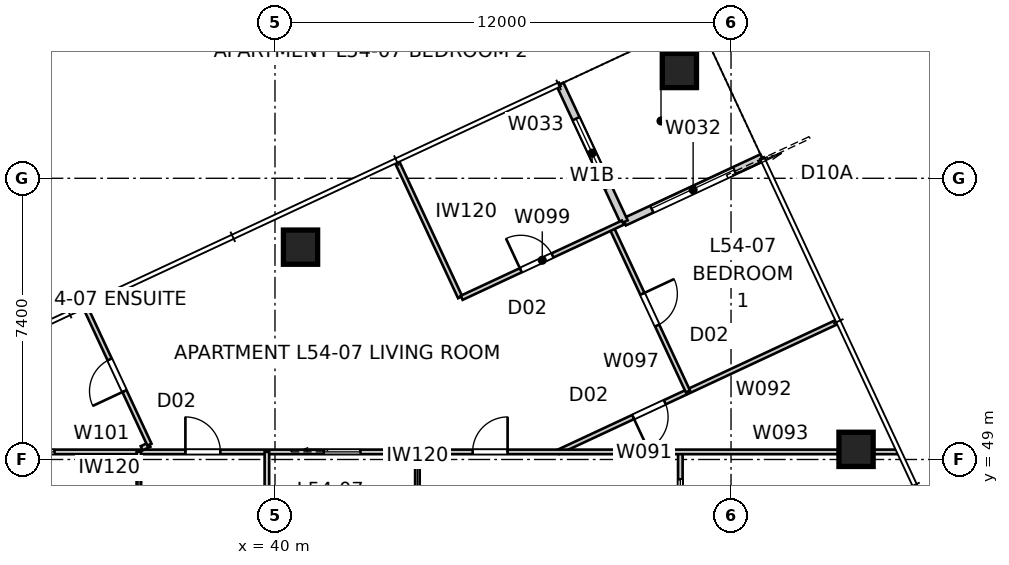
"""IFC4 building model, lengths in metres.
Left out: names, types, materials, properties, quantities, classifications, styles, units other than length and angle.
Written with IfcOpenShell. Run it as: python <this file> out.ifc"""

import sys

from ifc_helpers import new_model, si_unit, direction, frame, frame_2d, origin, origin_2d, place, context, subcontext, project, spatial, rectangle, extrude, element, fill, save


model = new_model("IFC4")
c1 = context("Model", 3, precision=1e-05, world=origin(), true_north=direction((0.0, 1.0)))
c2 = subcontext(c1, "Body", "Model", "MODEL_VIEW")
j1 = project(units=[si_unit("LENGTHUNIT", "METRE"), si_unit("PLANEANGLEUNIT", "RADIAN")], contexts=[c1])
p1 = place(None, origin())
s1 = spatial("IfcSite", under=j1, at=p1, CompositionType="ELEMENT")
p2 = place(p1, origin())
s2 = spatial("IfcBuilding", under=s1, at=p2, CompositionType="ELEMENT")
p3 = place(p2, frame((0.0, 0.0, 196.4)))
s3 = spatial("IfcBuildingStorey", under=s2, at=p3, CompositionType="ELEMENT", Elevation=196.4)
for number, where, z_axis, x_axis in (
    (1, (55.29, 49.267, 0.0), (0.0, 0.0, 1.0), (1.0, 0.0, 0.0)),
    (2, (50.641, 59.236, 0.0), (0.0, 0.0, 1.0), (1.0, 0.0, 0.0)),
    (3, (40.672, 54.588, 0.0), (0.0, 0.0, 1.0), (1.0, 0.0, 0.0)),
):
    element("IfcColumn", number, at=place(p3, frame(where, z_axis=z_axis, x_axis=x_axis)), inside=s3, PredefinedType="COLUMN", context=c2, shape_type="SweptSolid", body=[
        extrude(rectangle(XDim=0.9, YDim=0.9, at=origin_2d()), origin(), (0.0, 0.0, 1.0), 3.4),
    ])
p4 = place(p3, frame((52.815, 56.94, 0.0), z_axis=(0.0, 0.0, 1.0), x_axis=(-0.906289140828, -0.422658246362, 0.0)))
e4 = element("IfcWall", 4, at=p4, inside=s3, PredefinedType="SOLIDWALL", context=c2, shape_type="SweptSolid", body=[
    extrude(rectangle(XDim=4.0, YDim=0.2, at=frame_2d((2.0, 0.0))), origin(), (0.0, 0.0, 1.0), 3.25),
])
p5 = place(p4, frame((0.8, 0.0, 0.0)))
e5 = element("IfcOpeningElement", 5, at=p5, cuts=e4, PredefinedType="OPENING", context=c2, shape_type="SweptSolid", body=[
    extrude(rectangle(XDim=2.4, YDim=2.1, at=frame_2d((1.2, 1.05))), frame((0.0, 0.11, 0.0), z_axis=(0.0, -1.0, 0.0), x_axis=(1.0, 0.0, 0.0)), (0.0, 0.0, 1.0), 0.22),
])
p6 = place(p3, frame((49.19, 55.25, 0.0), z_axis=(0.0, 0.0, 1.0), x_axis=(-0.422658246362, 0.906289140828, 0.0)))
e6 = element("IfcWall", 6, at=p6, inside=s3, PredefinedType="SOLIDWALL", context=c2, shape_type="SweptSolid", body=[
    extrude(rectangle(XDim=4.0, YDim=0.2, at=frame_2d((2.0, 0.0))), origin(), (0.0, 0.0, 1.0), 3.25),
])
p7 = place(p6, frame((1.0, 0.0, 0.45)))
e7 = element("IfcOpeningElement", 7, at=p7, cuts=e6, PredefinedType="OPENING", context=c2, shape_type="SweptSolid", body=[
    extrude(rectangle(XDim=2.0, YDim=1.8, at=frame_2d((1.0, 0.9))), frame((0.0, 0.11, 0.0), z_axis=(0.0, -1.0, 0.0), x_axis=(1.0, 0.0, 0.0)), (0.0, 0.0, 1.0), 0.22),
])
p8 = place(p3, frame((50.666, 46.8, 0.0), z_axis=(0.0, 0.0, 1.0), x_axis=(0.0, 1.0, 0.0)))
e8 = element("IfcWall", 8, at=p8, inside=s3, PredefinedType="PARTITIONING", context=c2, shape_type="SweptSolid", body=[
    extrude(rectangle(XDim=2.4, YDim=0.12, at=frame_2d((1.2, 0.0))), origin(), (0.0, 0.0, 1.0), 3.25),
])
p9 = place(p8, frame((0.72, 0.0, 0.0)))
e9 = element("IfcOpeningElement", 9, at=p9, cuts=e8, PredefinedType="OPENING", context=c2, shape_type="SweptSolid", body=[
    extrude(rectangle(XDim=0.96, YDim=2.1, at=frame_2d((0.48, 1.05))), frame((0.0, 0.07, 0.0), z_axis=(0.0, -1.0, 0.0), x_axis=(1.0, 0.0, 0.0)), (0.0, 0.0, 1.0), 0.14),
])
p10 = place(p3, frame((54.787, 52.618, 0.0), z_axis=(0.0, 0.0, 1.0), x_axis=(-0.906311876708, -0.422609491301, 0.0)))
e10 = element("IfcWall", 10, at=p10, inside=s3, PredefinedType="PARTITIONING", context=c2, shape_type="SweptSolid", body=[
    extrude(rectangle(XDim=8.088, YDim=0.12, at=frame_2d((4.044, 0.0))), origin(), (0.0, 0.0, 1.0), 3.25),
])
p11 = place(p10, frame((4.997, 0.0, 0.0)))
e11 = element("IfcOpeningElement", 11, at=p11, cuts=e10, PredefinedType="OPENING", context=c2, shape_type="SweptSolid", body=[
    extrude(rectangle(XDim=0.92, YDim=2.34, at=frame_2d((0.46, 1.17))), frame((0.0, 0.07, 0.0), z_axis=(0.0, -1.0, 0.0), x_axis=(1.0, 0.0, 0.0)), (0.0, 0.0, 1.0), 0.14),
])
p12 = place(p3, frame((31.047, 49.2, 0.0), z_axis=(0.0, 0.0, 1.0), x_axis=(1.0, 0.0, 0.0)))
e12 = element("IfcWall", 12, at=p12, inside=s3, PredefinedType="PARTITIONING", context=c2, shape_type="SweptSolid", body=[
    extrude(rectangle(XDim=25.333, YDim=0.12, at=frame_2d((12.667, 0.0))), origin(), (0.0, 0.0, 1.0), 3.25),
])
p13 = place(p12, frame((14.154, 0.0, 0.0)))
e13 = element("IfcOpeningElement", 13, at=p13, cuts=e12, PredefinedType="OPENING", context=c2, shape_type="SweptSolid", body=[
    extrude(rectangle(XDim=0.92, YDim=2.34, at=frame_2d((0.46, 1.17))), frame((0.0, 0.07, 0.0), z_axis=(0.0, -1.0, 0.0), x_axis=(1.0, 0.0, 0.0)), (0.0, 0.0, 1.0), 0.14),
])
p14 = place(p12, frame((10.24, 0.0, 0.0)))
e14 = element("IfcOpeningElement", 14, at=p14, cuts=e12, PredefinedType="OPENING", context=c2, shape_type="SweptSolid", body=[
    extrude(rectangle(XDim=0.96, YDim=2.1, at=frame_2d((0.48, 1.05))), frame((0.0, 0.07, 0.0), z_axis=(0.0, -1.0, 0.0), x_axis=(1.0, 0.0, 0.0)), (0.0, 0.0, 1.0), 0.14),
])
p15 = place(p12, frame((6.596, 0.0, 0.0)))
e15 = element("IfcOpeningElement", 15, at=p15, cuts=e12, PredefinedType="OPENING", context=c2, shape_type="SweptSolid", body=[
    extrude(rectangle(XDim=0.92, YDim=2.34, at=frame_2d((0.46, 1.17))), frame((0.0, 0.07, 0.0), z_axis=(0.0, -1.0, 0.0), x_axis=(1.0, 0.0, 0.0)), (0.0, 0.0, 1.0), 0.14),
])
p16 = place(p12, frame((2.19, 0.0, 0.0)))
e16 = element("IfcOpeningElement", 16, at=p16, cuts=e12, PredefinedType="OPENING", context=c2, shape_type="SweptSolid", body=[
    extrude(rectangle(XDim=0.96, YDim=2.1, at=frame_2d((0.48, 1.05))), frame((0.0, 0.07, 0.0), z_axis=(0.0, -1.0, 0.0), x_axis=(1.0, 0.0, 0.0)), (0.0, 0.0, 1.0), 0.14),
])
for number, where, z_axis, x_axis in (
    (17, (43.748, 46.8, 0.0), (0.0, 0.0, 1.0), (0.0, 1.0, 0.0)),
    (18, (36.418, 49.2, 0.0), (0.0, 0.0, 1.0), (0.0, -1.0, 0.0)),
    (19, (39.787, 46.8, 0.0), (0.0, 0.0, 1.0), (0.0, 1.0, 0.0)),
):
    element("IfcWall", number, at=place(p3, frame(where, z_axis=z_axis, x_axis=x_axis)), inside=s3, PredefinedType="PARTITIONING", context=c2, shape_type="SweptSolid", body=[
        extrude(rectangle(XDim=2.4, YDim=0.12, at=frame_2d((1.2, 0.0))), origin(), (0.0, 0.0, 1.0), 3.25),
    ])
p17 = place(p3, frame((48.858, 55.095, 0.0), z_axis=(0.0, 0.0, 1.0), x_axis=(0.422643468278, -0.906296032609, 0.0)))
e20 = element("IfcWall", 20, at=p17, inside=s3, PredefinedType="PARTITIONING", context=c2, shape_type="SweptSolid", body=[
    extrude(rectangle(XDim=4.75, YDim=0.12, at=frame_2d((2.375, 0.0))), origin(), (0.0, 0.0, 1.0), 3.25),
])
p18 = place(p17, frame((1.915, 0.0, 0.0)))
e21 = element("IfcOpeningElement", 21, at=p18, cuts=e20, PredefinedType="OPENING", context=c2, shape_type="SweptSolid", body=[
    extrude(rectangle(XDim=0.92, YDim=2.34, at=frame_2d((0.46, 1.17))), frame((0.0, 0.07, 0.0), z_axis=(0.0, -1.0, 0.0), x_axis=(1.0, 0.0, 0.0)), (0.0, 0.0, 1.0), 0.14),
])
p19 = place(p3, frame((43.211, 56.831, 0.0), z_axis=(0.0, 0.0, 1.0), x_axis=(0.422671204118, -0.906283097718, 0.0)))
e22 = element("IfcWall", 22, at=p19, inside=s3, PredefinedType="PARTITIONING", context=c2, shape_type="SweptSolid", body=[
    extrude(rectangle(XDim=3.93, YDim=0.12, at=frame_2d((1.965, 0.0))), origin(), (0.0, 0.0, 1.0), 3.25),
])
p20 = place(p3, frame((44.912, 53.255, 0.0), z_axis=(0.0, 0.0, 1.0), x_axis=(0.906311042885, 0.42261127948, 0.0)))
e23 = element("IfcWall", 23, at=p20, inside=s3, PredefinedType="PARTITIONING", context=c2, shape_type="SweptSolid", body=[
    extrude(rectangle(XDim=4.68, YDim=0.12, at=frame_2d((2.34, 0.0))), origin(), (0.0, 0.0, 1.0), 3.25),
])
p21 = place(p20, frame((1.717, 0.0, 0.0)))
e24 = element("IfcOpeningElement", 24, at=p21, cuts=e23, PredefinedType="OPENING", context=c2, shape_type="SweptSolid", body=[
    extrude(rectangle(XDim=0.92, YDim=2.34, at=frame_2d((0.46, 1.17))), frame((0.0, 0.07, 0.0), z_axis=(0.0, -1.0, 0.0), x_axis=(1.0, 0.0, 0.0)), (0.0, 0.0, 1.0), 0.14),
])
p22 = place(p3, frame((36.492, 49.295, 0.0), z_axis=(0.0, 0.0, 1.0), x_axis=(0.906653589403, 0.421875892677, 0.0)))
e25 = element("IfcWall", 25, at=p22, inside=s3, PredefinedType="PARTITIONING", context=c2, shape_type="SweptSolid", body=[
    extrude(rectangle(XDim=0.225, YDim=0.12, at=frame_2d((0.113, 0.0))), origin(), (0.0, 0.0, 1.0), 3.25),
])
p23 = place(p3, frame((36.697, 49.39, 0.0), z_axis=(0.0, 0.0, 1.0), x_axis=(-0.422771582019, 0.906236276827, 0.0)))
e26 = element("IfcWall", 26, at=p23, inside=s3, PredefinedType="PARTITIONING", context=c2, shape_type="SweptSolid", body=[
    extrude(rectangle(XDim=3.99, YDim=0.12, at=frame_2d((1.995, 0.0))), origin(), (0.0, 0.0, 1.0), 3.25),
])
p24 = place(p23, frame((1.555, 0.0, 0.0)))
e27 = element("IfcOpeningElement", 27, at=p24, cuts=e26, PredefinedType="OPENING", context=c2, shape_type="SweptSolid", body=[
    extrude(rectangle(XDim=0.92, YDim=2.34, at=frame_2d((0.46, 1.17))), frame((0.0, 0.07, 0.0), z_axis=(0.0, -1.0, 0.0), x_axis=(1.0, 0.0, 0.0)), (0.0, 0.0, 1.0), 0.14),
])
p25 = place(p5, origin())
e28 = element("IfcDoor", 28, at=p25, inside=s3, OperationType="SLIDING_TO_LEFT", PredefinedType="DOOR", context=c2, shape_type="SweptSolid", body=[
    extrude(rectangle(XDim=2.4, YDim=2.1, at=frame_2d((1.2, 1.05))), frame((0.0, 0.025, 0.0), z_axis=(0.0, -1.0, 0.0), x_axis=(1.0, 0.0, 0.0)), (0.0, 0.0, 1.0), 0.05),
])
fill(e5, e28)
p26 = place(p7, origin())
e29 = element("IfcWindow", 29, at=p26, inside=s3, PartitioningType="SINGLE_PANEL", PredefinedType="WINDOW", context=c2, shape_type="SweptSolid", body=[
    extrude(rectangle(XDim=2.0, YDim=1.8, at=frame_2d((1.0, 0.9))), frame((0.0, 0.03, 0.0), z_axis=(0.0, -1.0, 0.0), x_axis=(1.0, 0.0, 0.0)), (0.0, 0.0, 1.0), 0.06),
])
fill(e7, e29)
p27 = place(p13, origin())
e30 = element("IfcDoor", 30, at=p27, inside=s3, OperationType="SINGLE_SWING_RIGHT", PredefinedType="DOOR", context=c2, shape_type="SweptSolid", body=[
    extrude(rectangle(XDim=0.92, YDim=2.34, at=frame_2d((0.46, 1.17))), frame((0.0, 0.025, 0.0), z_axis=(0.0, -1.0, 0.0), x_axis=(1.0, 0.0, 0.0)), (0.0, 0.0, 1.0), 0.05),
])
fill(e13, e30)
p28 = place(p9, origin())
e31 = element("IfcDoor", 31, at=p28, inside=s3, OperationType="SLIDING_TO_LEFT", PredefinedType="DOOR", context=c2, shape_type="SweptSolid", body=[
    extrude(rectangle(XDim=0.96, YDim=2.1, at=frame_2d((0.48, 1.05))), frame((0.0, 0.025, 0.0), z_axis=(0.0, -1.0, 0.0), x_axis=(1.0, 0.0, 0.0)), (0.0, 0.0, 1.0), 0.05),
])
fill(e9, e31)
p29 = place(p18, origin())
e32 = element("IfcDoor", 32, at=p29, inside=s3, OperationType="SINGLE_SWING_LEFT", PredefinedType="DOOR", context=c2, shape_type="SweptSolid", body=[
    extrude(rectangle(XDim=0.92, YDim=2.34, at=frame_2d((0.46, 1.17))), frame((0.0, 0.025, 0.0), z_axis=(0.0, -1.0, 0.0), x_axis=(1.0, 0.0, 0.0)), (0.0, 0.0, 1.0), 0.05),
])
fill(e21, e32)
p30 = place(p21, origin())
e33 = element("IfcDoor", 33, at=p30, inside=s3, OperationType="SINGLE_SWING_LEFT", PredefinedType="DOOR", context=c2, shape_type="SweptSolid", body=[
    extrude(rectangle(XDim=0.92, YDim=2.34, at=frame_2d((0.46, 1.17))), frame((0.0, 0.025, 0.0), z_axis=(0.0, -1.0, 0.0), x_axis=(1.0, 0.0, 0.0)), (0.0, 0.0, 1.0), 0.05),
])
fill(e24, e33)
p31 = place(p24, origin())
e34 = element("IfcDoor", 34, at=p31, inside=s3, OperationType="SINGLE_SWING_LEFT", PredefinedType="DOOR", context=c2, shape_type="SweptSolid", body=[
    extrude(rectangle(XDim=0.92, YDim=2.34, at=frame_2d((0.46, 1.17))), frame((0.0, 0.025, 0.0), z_axis=(0.0, -1.0, 0.0), x_axis=(1.0, 0.0, 0.0)), (0.0, 0.0, 1.0), 0.05),
])
fill(e27, e34)
p32 = place(p14, origin())
e35 = element("IfcDoor", 35, at=p32, inside=s3, OperationType="SLIDING_TO_LEFT", PredefinedType="DOOR", context=c2, shape_type="SweptSolid", body=[
    extrude(rectangle(XDim=0.96, YDim=2.1, at=frame_2d((0.48, 1.05))), frame((0.0, 0.025, 0.0), z_axis=(0.0, -1.0, 0.0), x_axis=(1.0, 0.0, 0.0)), (0.0, 0.0, 1.0), 0.05),
])
fill(e14, e35)
p33 = place(p11, origin())
e36 = element("IfcDoor", 36, at=p33, inside=s3, OperationType="SINGLE_SWING_RIGHT", PredefinedType="DOOR", context=c2, shape_type="SweptSolid", body=[
    extrude(rectangle(XDim=0.92, YDim=2.34, at=frame_2d((0.46, 1.17))), frame((0.0, 0.025, 0.0), z_axis=(0.0, -1.0, 0.0), x_axis=(1.0, 0.0, 0.0)), (0.0, 0.0, 1.0), 0.05),
])
fill(e11, e36)
p34 = place(p15, origin())
e37 = element("IfcDoor", 37, at=p34, inside=s3, OperationType="SINGLE_SWING_LEFT", PredefinedType="DOOR", context=c2, shape_type="SweptSolid", body=[
    extrude(rectangle(XDim=0.92, YDim=2.34, at=frame_2d((0.46, 1.17))), frame((0.0, 0.025, 0.0), z_axis=(0.0, -1.0, 0.0), x_axis=(1.0, 0.0, 0.0)), (0.0, 0.0, 1.0), 0.05),
])
fill(e15, e37)
p35 = place(p16, origin())
e38 = element("IfcDoor", 38, at=p35, inside=s3, OperationType="SLIDING_TO_LEFT", PredefinedType="DOOR", context=c2, shape_type="SweptSolid", body=[
    extrude(rectangle(XDim=0.96, YDim=2.1, at=frame_2d((0.48, 1.05))), frame((0.0, 0.025, 0.0), z_axis=(0.0, -1.0, 0.0), x_axis=(1.0, 0.0, 0.0)), (0.0, 0.0, 1.0), 0.05),
])
fill(e16, e38)
save(model, sys.argv[1])
